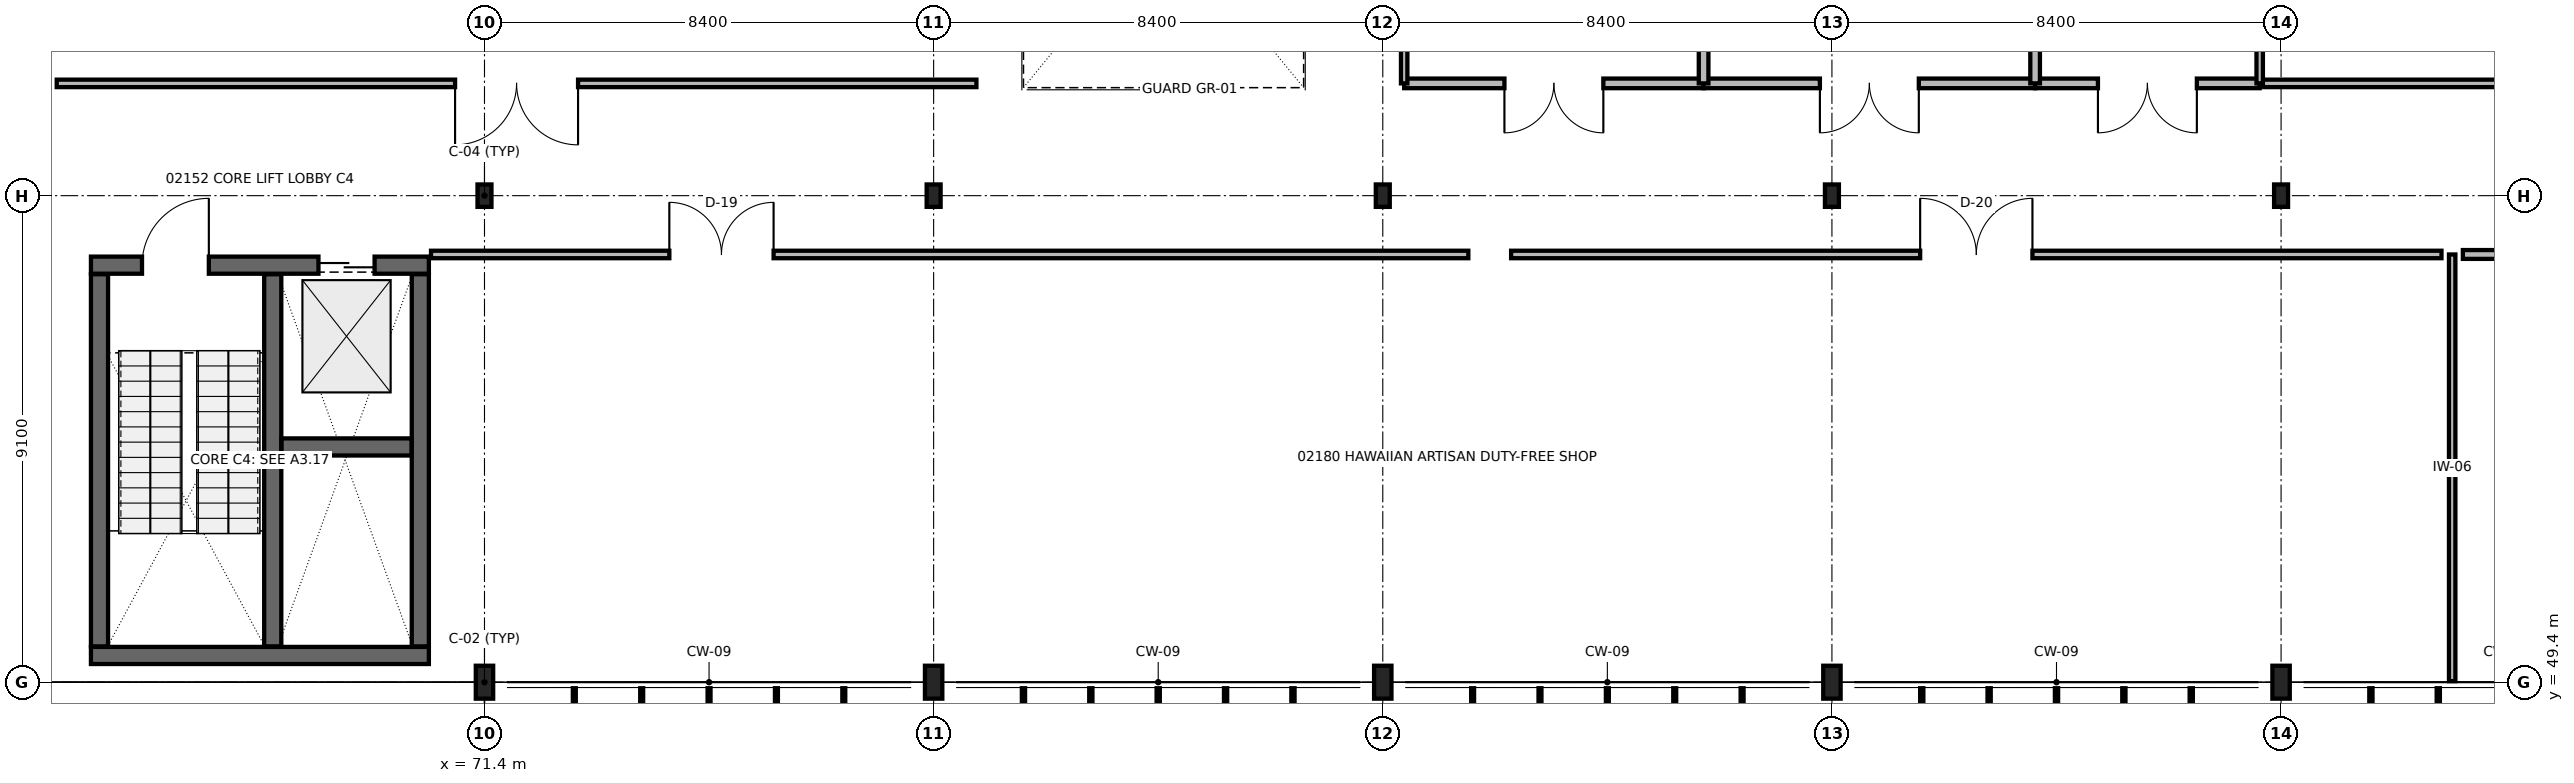
"""IFC4 building model, lengths in metres.
Left out: names, types, materials, properties, quantities, classifications, styles, units other than length and angle.
Written with IfcOpenShell. Run it as: python <this file> out.ifc"""

import sys

from ifc_helpers import new_model, si_unit, direction, frame, frame_2d, origin, origin_2d, place, context, subcontext, project, spatial, rectangle, i_section, extrude, element, fill, save


model = new_model("IFC4")
c1 = context("Model", 3, precision=1e-05, world=origin(), true_north=direction((0.0, 1.0)))
c2 = subcontext(c1, "Body", "Model", "MODEL_VIEW")
j1 = project(units=[si_unit("LENGTHUNIT", "METRE"), si_unit("PLANEANGLEUNIT", "RADIAN")], contexts=[c1])
p1 = place(None, origin())
s1 = spatial("IfcSite", under=j1, at=p1, CompositionType="ELEMENT")
p2 = place(p1, origin())
s2 = spatial("IfcBuilding", under=s1, at=p2, CompositionType="ELEMENT")
p3 = place(p2, frame((0.0, 0.0, 9.6)))
s3 = spatial("IfcBuildingStorey", under=s2, at=p3, CompositionType="ELEMENT", Elevation=9.6)
p4 = place(p3, frame((71.4, 49.4, 0.0), z_axis=(0.0, 0.0, 1.0), x_axis=(1.0, 0.0, 0.0)))
e1 = element("IfcColumn", 1, at=p4, inside=s3, PredefinedType="COLUMN", context=c2, shape_type="SweptSolid", body=[
    extrude(i_section(OverallWidth=0.325, OverallDepth=0.616, WebThickness=0.014, FlangeThickness=0.021, at=origin_2d()), origin(), (0.0, 0.0, 1.0), 4.2),
])
p5 = place(p3, frame((71.4, 58.5, 0.0), z_axis=(0.0, 0.0, 1.0), x_axis=(1.0, 0.0, 0.0)))
e2 = element("IfcColumn", 2, at=p5, inside=s3, PredefinedType="COLUMN", context=c2, shape_type="SweptSolid", body=[
    extrude(i_section(OverallWidth=0.261, OverallDepth=0.419, WebThickness=0.012, FlangeThickness=0.019, at=origin_2d()), origin(), (0.0, 0.0, 1.0), 4.2),
])
p6 = place(p3, frame((79.8, 49.4, 0.0), z_axis=(0.0, 0.0, 1.0), x_axis=(1.0, 0.0, 0.0)))
e3 = element("IfcColumn", 3, at=p6, inside=s3, PredefinedType="COLUMN", context=c2, shape_type="SweptSolid", body=[
    extrude(i_section(OverallWidth=0.325, OverallDepth=0.616, WebThickness=0.014, FlangeThickness=0.021, at=origin_2d()), origin(), (0.0, 0.0, 1.0), 4.2),
])
p7 = place(p3, frame((79.8, 58.5, 0.0), z_axis=(0.0, 0.0, 1.0), x_axis=(1.0, 0.0, 0.0)))
e4 = element("IfcColumn", 4, at=p7, inside=s3, PredefinedType="COLUMN", context=c2, shape_type="SweptSolid", body=[
    extrude(i_section(OverallWidth=0.261, OverallDepth=0.419, WebThickness=0.012, FlangeThickness=0.019, at=origin_2d()), origin(), (0.0, 0.0, 1.0), 4.2),
])
p8 = place(p3, frame((88.2, 49.4, 0.0), z_axis=(0.0, 0.0, 1.0), x_axis=(1.0, 0.0, 0.0)))
e5 = element("IfcColumn", 5, at=p8, inside=s3, PredefinedType="COLUMN", context=c2, shape_type="SweptSolid", body=[
    extrude(i_section(OverallWidth=0.325, OverallDepth=0.616, WebThickness=0.014, FlangeThickness=0.021, at=origin_2d()), origin(), (0.0, 0.0, 1.0), 4.2),
])
p9 = place(p3, frame((88.2, 58.5, 0.0), z_axis=(0.0, 0.0, 1.0), x_axis=(1.0, 0.0, 0.0)))
e6 = element("IfcColumn", 6, at=p9, inside=s3, PredefinedType="COLUMN", context=c2, shape_type="SweptSolid", body=[
    extrude(i_section(OverallWidth=0.261, OverallDepth=0.419, WebThickness=0.012, FlangeThickness=0.019, at=origin_2d()), origin(), (0.0, 0.0, 1.0), 4.2),
])
p10 = place(p3, frame((96.6, 49.4, 0.0), z_axis=(0.0, 0.0, 1.0), x_axis=(1.0, 0.0, 0.0)))
e7 = element("IfcColumn", 7, at=p10, inside=s3, PredefinedType="COLUMN", context=c2, shape_type="SweptSolid", body=[
    extrude(i_section(OverallWidth=0.325, OverallDepth=0.616, WebThickness=0.014, FlangeThickness=0.021, at=origin_2d()), origin(), (0.0, 0.0, 1.0), 4.2),
])
p11 = place(p3, frame((96.6, 58.5, 0.0), z_axis=(0.0, 0.0, 1.0), x_axis=(1.0, 0.0, 0.0)))
e8 = element("IfcColumn", 8, at=p11, inside=s3, PredefinedType="COLUMN", context=c2, shape_type="SweptSolid", body=[
    extrude(i_section(OverallWidth=0.261, OverallDepth=0.419, WebThickness=0.012, FlangeThickness=0.019, at=origin_2d()), origin(), (0.0, 0.0, 1.0), 4.2),
])
p12 = place(p3, frame((105.0, 49.4, 0.0), z_axis=(0.0, 0.0, 1.0), x_axis=(1.0, 0.0, 0.0)))
e9 = element("IfcColumn", 9, at=p12, inside=s3, PredefinedType="COLUMN", context=c2, shape_type="SweptSolid", body=[
    extrude(i_section(OverallWidth=0.325, OverallDepth=0.616, WebThickness=0.014, FlangeThickness=0.021, at=origin_2d()), origin(), (0.0, 0.0, 1.0), 4.2),
])
p13 = place(p3, frame((105.0, 58.5, 0.0), z_axis=(0.0, 0.0, 1.0), x_axis=(1.0, 0.0, 0.0)))
e10 = element("IfcColumn", 10, at=p13, inside=s3, PredefinedType="COLUMN", context=c2, shape_type="SweptSolid", body=[
    extrude(i_section(OverallWidth=0.261, OverallDepth=0.419, WebThickness=0.012, FlangeThickness=0.019, at=origin_2d()), origin(), (0.0, 0.0, 1.0), 4.2),
])
p14 = place(p3, frame((64.04, 49.9, 0.0), z_axis=(0.0, 0.0, 1.0), x_axis=(1.0, 0.0, 0.0)))
e11 = element("IfcWall", 11, at=p14, inside=s3, PredefinedType="SHEAR", context=c2, shape_type="SweptSolid", body=[
    extrude(rectangle(XDim=6.32, YDim=0.32, at=frame_2d((3.16, 0.0))), origin(), (0.0, 0.0, 1.0), 3.92),
])
p15 = place(p3, frame((64.04, 57.2, 0.0), z_axis=(0.0, 0.0, 1.0), x_axis=(1.0, 0.0, 0.0)))
e12 = element("IfcWall", 12, at=p15, inside=s3, PredefinedType="SHEAR", context=c2, shape_type="SweptSolid", body=[
    extrude(rectangle(XDim=6.32, YDim=0.32, at=frame_2d((3.16, 0.0))), origin(), (0.0, 0.0, 1.0), 3.92),
])
p16 = place(p15, frame((0.955, 0.0, 0.0)))
e13 = element("IfcOpeningElement", 13, at=p16, cuts=e12, PredefinedType="OPENING", context=c2, shape_type="SweptSolid", body=[
    extrude(rectangle(XDim=1.25, YDim=2.2, at=frame_2d((0.625, 1.1))), frame((0.0, 0.17, 0.0), z_axis=(0.0, -1.0, 0.0), x_axis=(1.0, 0.0, 0.0)), (0.0, 0.0, 1.0), 0.34),
])
p17 = place(p15, frame((4.255, 0.0, 0.0)))
e14 = element("IfcOpeningElement", 14, at=p17, cuts=e12, PredefinedType="OPENING", context=c2, shape_type="SweptSolid", body=[
    extrude(rectangle(XDim=1.05, YDim=2.15, at=frame_2d((0.525, 1.075))), frame((0.0, 0.17, 0.0), z_axis=(0.0, -1.0, 0.0), x_axis=(1.0, 0.0, 0.0)), (0.0, 0.0, 1.0), 0.34),
])
for number, where, z_axis, x_axis in (
    (15, (64.2, 50.07, 0.0), (0.0, 0.0, 1.0), (0.0, 1.0, 0.0)),
    (16, (70.2, 50.07, 0.0), (0.0, 0.0, 1.0), (0.0, 1.0, 0.0)),
    (17, (67.44, 50.07, 0.0), (0.0, 0.0, 1.0), (0.0, 1.0, 0.0)),
):
    element("IfcWall", number, at=place(p3, frame(where, z_axis=z_axis, x_axis=x_axis)), inside=s3, PredefinedType="SHEAR", context=c2, shape_type="SweptSolid", body=[
        extrude(rectangle(XDim=6.96, YDim=0.32, at=frame_2d((3.48, 0.0))), origin(), (0.0, 0.0, 1.0), 3.92),
    ])
p18 = place(p3, frame((67.605, 53.8, 0.0), z_axis=(0.0, 0.0, 1.0), x_axis=(1.0, 0.0, 0.0)))
e18 = element("IfcWall", 18, at=p18, inside=s3, PredefinedType="SHEAR", context=c2, shape_type="SweptSolid", body=[
    extrude(rectangle(XDim=2.43, YDim=0.32, at=frame_2d((1.215, 0.0))), origin(), (0.0, 0.0, 1.0), 3.92),
])
p19 = place(p3, frame((70.4, 57.4, 0.0), z_axis=(0.0, 0.0, 1.0), x_axis=(1.0, 0.0, 0.0)))
e19 = element("IfcWall", 19, at=p19, inside=s3, PredefinedType="PARTITIONING", context=c2, shape_type="SweptSolid", body=[
    extrude(rectangle(XDim=19.4, YDim=0.14, at=frame_2d((9.7, 0.0))), origin(), (0.0, 0.0, 1.0), 3.242),
])
p20 = place(p19, frame((4.457, 0.0, 0.0)))
e20 = element("IfcOpeningElement", 20, at=p20, cuts=e19, PredefinedType="OPENING", context=c2, shape_type="SweptSolid", body=[
    extrude(rectangle(XDim=1.95, YDim=2.35, at=frame_2d((0.975, 1.175))), frame((0.0, 0.08, 0.0), z_axis=(0.0, -1.0, 0.0), x_axis=(1.0, 0.0, 0.0)), (0.0, 0.0, 1.0), 0.16),
])
p21 = place(p3, frame((90.6, 57.4, 0.0), z_axis=(0.0, 0.0, 1.0), x_axis=(1.0, 0.0, 0.0)))
e21 = element("IfcWall", 21, at=p21, inside=s3, PredefinedType="PARTITIONING", context=c2, shape_type="SweptSolid", body=[
    extrude(rectangle(XDim=17.4, YDim=0.14, at=frame_2d((8.7, 0.0))), origin(), (0.0, 0.0, 1.0), 3.242),
])
p22 = place(p21, frame((7.65, 0.0, 0.0)))
e22 = element("IfcOpeningElement", 22, at=p22, cuts=e21, PredefinedType="OPENING", context=c2, shape_type="SweptSolid", body=[
    extrude(rectangle(XDim=2.1, YDim=2.4, at=frame_2d((1.05, 1.2))), frame((0.0, 0.08, 0.0), z_axis=(0.0, -1.0, 0.0), x_axis=(1.0, 0.0, 0.0)), (0.0, 0.0, 1.0), 0.16),
])
p23 = place(p3, frame((108.4, 57.4, 0.0), z_axis=(0.0, 0.0, 1.0), x_axis=(1.0, 0.0, 0.0)))
e23 = element("IfcWall", 23, at=p23, inside=s3, PredefinedType="PARTITIONING", context=c2, shape_type="SweptSolid", body=[
    extrude(rectangle(XDim=30.16, YDim=0.165, at=frame_2d((15.08, 0.0))), origin(), (0.0, 0.0, 1.0), 3.242),
])
p24 = place(p23, frame((14.405, 0.0, 0.0)))
e24 = element("IfcOpeningElement", 24, at=p24, cuts=e23, PredefinedType="OPENING", context=c2, shape_type="SweptSolid", body=[
    extrude(rectangle(XDim=1.35, YDim=2.2, at=frame_2d((0.675, 1.1))), frame((0.0, 0.093, 0.0), z_axis=(0.0, -1.0, 0.0), x_axis=(1.0, 0.0, 0.0)), (0.0, 0.0, 1.0), 0.185),
])
p25 = place(p3, frame((108.2, 49.42, 0.0), z_axis=(0.0, 0.0, 1.0), x_axis=(0.0, 1.0, 0.0)))
e25 = element("IfcWall", 25, at=p25, inside=s3, PredefinedType="PARTITIONING", context=c2, shape_type="SweptSolid", body=[
    extrude(rectangle(XDim=7.98, YDim=0.12, at=frame_2d((3.99, 0.0))), origin(), (0.0, 0.0, 1.0), 3.92),
])
p26 = place(p3, frame((63.4, 60.6, 0.0), z_axis=(0.0, 0.0, 1.0), x_axis=(1.0, 0.0, 0.0)))
e26 = element("IfcWall", 26, at=p26, inside=s3, PredefinedType="PARTITIONING", context=c2, shape_type="SweptSolid", body=[
    extrude(rectangle(XDim=17.2, YDim=0.14, at=frame_2d((8.6, 0.0))), origin(), (0.0, 0.0, 1.0), 3.242),
])
p27 = place(p26, frame((7.45, 0.0, 0.0)))
e27 = element("IfcOpeningElement", 27, at=p27, cuts=e26, PredefinedType="OPENING", context=c2, shape_type="SweptSolid", body=[
    extrude(rectangle(XDim=2.3, YDim=2.45, at=frame_2d((1.15, 1.225))), frame((0.0, 0.08, 0.0), z_axis=(0.0, -1.0, 0.0), x_axis=(1.0, 0.0, 0.0)), (0.0, 0.0, 1.0), 0.16),
])
p28 = place(p3, frame((88.6, 60.6, 0.0), z_axis=(0.0, 0.0, 1.0), x_axis=(1.0, 0.0, 0.0)))
e28 = element("IfcWall", 28, at=p28, inside=s3, PredefinedType="PARTITIONING", context=c2, shape_type="SweptSolid", body=[
    extrude(rectangle(XDim=5.6, YDim=0.18, at=frame_2d((2.8, 0.0))), origin(), (0.0, 0.0, 1.0), 3.398),
])
p29 = place(p28, frame((1.875, 0.0, 0.0)))
e29 = element("IfcOpeningElement", 29, at=p29, cuts=e28, PredefinedType="OPENING", context=c2, shape_type="SweptSolid", body=[
    extrude(rectangle(XDim=1.85, YDim=2.3, at=frame_2d((0.925, 1.15))), frame((0.0, 0.1, 0.0), z_axis=(0.0, -1.0, 0.0), x_axis=(1.0, 0.0, 0.0)), (0.0, 0.0, 1.0), 0.2),
])
p30 = place(p3, frame((94.2, 60.6, 0.0), z_axis=(0.0, 0.0, 1.0), x_axis=(1.0, 0.0, 0.0)))
e30 = element("IfcWall", 30, at=p30, inside=s3, PredefinedType="PARTITIONING", context=c2, shape_type="SweptSolid", body=[
    extrude(rectangle(XDim=6.2, YDim=0.18, at=frame_2d((3.1, 0.0))), origin(), (0.0, 0.0, 1.0), 3.242),
])
p31 = place(p30, frame((2.175, 0.0, 0.0)))
e31 = element("IfcOpeningElement", 31, at=p31, cuts=e30, PredefinedType="OPENING", context=c2, shape_type="SweptSolid", body=[
    extrude(rectangle(XDim=1.85, YDim=2.3, at=frame_2d((0.925, 1.15))), frame((0.0, 0.1, 0.0), z_axis=(0.0, -1.0, 0.0), x_axis=(1.0, 0.0, 0.0)), (0.0, 0.0, 1.0), 0.2),
])
p32 = place(p3, frame((100.4, 60.6, 0.0), z_axis=(0.0, 0.0, 1.0), x_axis=(1.0, 0.0, 0.0)))
e32 = element("IfcWall", 32, at=p32, inside=s3, PredefinedType="PARTITIONING", context=c2, shape_type="SweptSolid", body=[
    extrude(rectangle(XDim=4.2, YDim=0.18, at=frame_2d((2.1, 0.0))), origin(), (0.0, 0.0, 1.0), 3.398),
])
p33 = place(p32, frame((1.175, 0.0, 0.0)))
e33 = element("IfcOpeningElement", 33, at=p33, cuts=e32, PredefinedType="OPENING", context=c2, shape_type="SweptSolid", body=[
    extrude(rectangle(XDim=1.85, YDim=2.3, at=frame_2d((0.925, 1.15))), frame((0.0, 0.1, 0.0), z_axis=(0.0, -1.0, 0.0), x_axis=(1.0, 0.0, 0.0)), (0.0, 0.0, 1.0), 0.2),
])
p34 = place(p3, frame((104.6, 60.6, 0.0), z_axis=(0.0, 0.0, 1.0), x_axis=(1.0, 0.0, 0.0)))
e34 = element("IfcWall", 34, at=p34, inside=s3, PredefinedType="PARTITIONING", context=c2, shape_type="SweptSolid", body=[
    extrude(rectangle(XDim=33.96, YDim=0.14, at=frame_2d((16.98, 0.0))), origin(), (0.0, 0.0, 1.0), 3.242),
])
p35 = place(p34, frame((14.407, 0.0, 0.0)))
e35 = element("IfcOpeningElement", 35, at=p35, cuts=e34, PredefinedType="OPENING", context=c2, shape_type="SweptSolid", body=[
    extrude(rectangle(XDim=1.75, YDim=2.35, at=frame_2d((0.875, 1.175))), frame((0.0, 0.08, 0.0), z_axis=(0.0, -1.0, 0.0), x_axis=(1.0, 0.0, 0.0)), (0.0, 0.0, 1.0), 0.16),
])
p36 = place(p3, frame((88.6, 60.6, 0.0), z_axis=(0.0, 0.0, 1.0), x_axis=(0.0, 1.0, 0.0)))
e36 = element("IfcWall", 36, at=p36, inside=s3, PredefinedType="PARTITIONING", context=c2, shape_type="SweptSolid", body=[
    extrude(rectangle(XDim=15.9, YDim=0.12, at=frame_2d((7.95, 0.0))), origin(), (0.0, 0.0, 1.0), 3.242),
])
p37 = place(p36, frame((10.298, 0.0, 0.0)))
e37 = element("IfcOpeningElement", 37, at=p37, cuts=e36, PredefinedType="OPENING", context=c2, shape_type="SweptSolid", body=[
    extrude(rectangle(XDim=2.3, YDim=2.45, at=frame_2d((1.15, 1.225))), frame((0.0, 0.07, 0.0), z_axis=(0.0, -1.0, 0.0), x_axis=(1.0, 0.0, 0.0)), (0.0, 0.0, 1.0), 0.14),
])
p38 = place(p3, frame((94.2, 60.6, 0.0), z_axis=(0.0, 0.0, 1.0), x_axis=(0.0, 1.0, 0.0)))
e38 = element("IfcWall", 38, at=p38, inside=s3, PredefinedType="PARTITIONING", context=c2, shape_type="SweptSolid", body=[
    extrude(rectangle(XDim=43.6, YDim=0.18, at=frame_2d((21.8, 0.0))), origin(), (0.0, 0.0, 1.0), 2.54),
])
p39 = place(p38, frame((12.155, 0.0, 0.0)))
e39 = element("IfcOpeningElement", 39, at=p39, cuts=e38, PredefinedType="OPENING", context=c2, shape_type="SweptSolid", body=[
    extrude(rectangle(XDim=1.85, YDim=2.3, at=frame_2d((0.925, 1.15))), frame((0.0, 0.1, 0.0), z_axis=(0.0, -1.0, 0.0), x_axis=(1.0, 0.0, 0.0)), (0.0, 0.0, 1.0), 0.2),
])
p40 = place(p38, frame((33.083, 0.0, 0.0)))
e40 = element("IfcOpeningElement", 40, at=p40, cuts=e38, PredefinedType="OPENING", context=c2, shape_type="SweptSolid", body=[
    extrude(rectangle(XDim=1.85, YDim=2.3, at=frame_2d((0.925, 1.15))), frame((0.0, 0.1, 0.0), z_axis=(0.0, -1.0, 0.0), x_axis=(1.0, 0.0, 0.0)), (0.0, 0.0, 1.0), 0.2),
])
p41 = place(p3, frame((100.4, 60.6, 0.0), z_axis=(0.0, 0.0, 1.0), x_axis=(0.0, 1.0, 0.0)))
e41 = element("IfcWall", 41, at=p41, inside=s3, PredefinedType="PARTITIONING", context=c2, shape_type="SweptSolid", body=[
    extrude(rectangle(XDim=43.6, YDim=0.18, at=frame_2d((21.8, 0.0))), origin(), (0.0, 0.0, 1.0), 2.54),
])
p42 = place(p41, frame((12.155, 0.0, 0.0)))
e42 = element("IfcOpeningElement", 42, at=p42, cuts=e41, PredefinedType="OPENING", context=c2, shape_type="SweptSolid", body=[
    extrude(rectangle(XDim=1.85, YDim=2.3, at=frame_2d((0.925, 1.15))), frame((0.0, 0.1, 0.0), z_axis=(0.0, -1.0, 0.0), x_axis=(1.0, 0.0, 0.0)), (0.0, 0.0, 1.0), 0.2),
])
p43 = place(p41, frame((33.083, 0.0, 0.0)))
e43 = element("IfcOpeningElement", 43, at=p43, cuts=e41, PredefinedType="OPENING", context=c2, shape_type="SweptSolid", body=[
    extrude(rectangle(XDim=1.85, YDim=2.3, at=frame_2d((0.925, 1.15))), frame((0.0, 0.1, 0.0), z_axis=(0.0, -1.0, 0.0), x_axis=(1.0, 0.0, 0.0)), (0.0, 0.0, 1.0), 0.2),
])
p44 = place(p3, frame((104.6, 60.6, 0.0), z_axis=(0.0, 0.0, 1.0), x_axis=(0.0, 1.0, 0.0)))
e44 = element("IfcWall", 44, at=p44, inside=s3, PredefinedType="PARTITIONING", context=c2, shape_type="SweptSolid", body=[
    extrude(rectangle(XDim=15.9, YDim=0.12, at=frame_2d((7.95, 0.0))), origin(), (0.0, 0.0, 1.0), 3.242),
])
p45 = place(p44, frame((10.573, 0.0, 0.0)))
e45 = element("IfcOpeningElement", 45, at=p45, cuts=e44, PredefinedType="OPENING", context=c2, shape_type="SweptSolid", body=[
    extrude(rectangle(XDim=1.75, YDim=2.35, at=frame_2d((0.875, 1.175))), frame((0.0, 0.07, 0.0), z_axis=(0.0, -1.0, 0.0), x_axis=(1.0, 0.0, 0.0)), (0.0, 0.0, 1.0), 0.14),
])
p46 = place(p16, origin())
e46 = element("IfcDoor", 46, at=p46, inside=s3, OperationType="SINGLE_SWING_RIGHT", PredefinedType="DOOR", context=c2, shape_type="SweptSolid", body=[
    extrude(rectangle(XDim=1.25, YDim=2.2, at=frame_2d((0.625, 1.1))), frame((0.0, 0.025, 0.0), z_axis=(0.0, -1.0, 0.0), x_axis=(1.0, 0.0, 0.0)), (0.0, 0.0, 1.0), 0.05),
])
fill(e13, e46)
p47 = place(p17, origin())
e47 = element("IfcDoor", 47, at=p47, inside=s3, OperationType="DOUBLE_DOOR_SLIDING", PredefinedType="DOOR", context=c2, shape_type="SweptSolid", body=[
    extrude(rectangle(XDim=1.05, YDim=2.15, at=frame_2d((0.525, 1.075))), frame((0.0, 0.025, 0.0), z_axis=(0.0, -1.0, 0.0), x_axis=(1.0, 0.0, 0.0)), (0.0, 0.0, 1.0), 0.05),
])
fill(e14, e47)
p48 = place(p20, origin())
e48 = element("IfcDoor", 48, at=p48, inside=s3, OperationType="DOUBLE_DOOR_SINGLE_SWING", PredefinedType="DOOR", context=c2, shape_type="SweptSolid", body=[
    extrude(rectangle(XDim=1.95, YDim=2.35, at=frame_2d((0.975, 1.175))), frame((0.0, 0.025, 0.0), z_axis=(0.0, -1.0, 0.0), x_axis=(1.0, 0.0, 0.0)), (0.0, 0.0, 1.0), 0.05),
])
fill(e20, e48)
p49 = place(p22, origin())
e49 = element("IfcDoor", 49, at=p49, inside=s3, OperationType="DOUBLE_DOOR_SINGLE_SWING", PredefinedType="DOOR", context=c2, shape_type="SweptSolid", body=[
    extrude(rectangle(XDim=2.1, YDim=2.4, at=frame_2d((1.05, 1.2))), frame((0.0, 0.025, 0.0), z_axis=(0.0, -1.0, 0.0), x_axis=(1.0, 0.0, 0.0)), (0.0, 0.0, 1.0), 0.05),
])
fill(e22, e49)
p50 = place(p27, frame((2.3, 0.0, 0.0), z_axis=(0.0, 0.0, 1.0), x_axis=(-1.0, 0.0, 0.0)))
e50 = element("IfcDoor", 50, at=p50, inside=s3, OperationType="DOUBLE_DOOR_SINGLE_SWING", PredefinedType="DOOR", context=c2, shape_type="SweptSolid", body=[
    extrude(rectangle(XDim=2.3, YDim=2.45, at=frame_2d((1.15, 1.225))), frame((0.0, 0.025, 0.0), z_axis=(0.0, -1.0, 0.0), x_axis=(1.0, 0.0, 0.0)), (0.0, 0.0, 1.0), 0.05),
])
fill(e27, e50)
p51 = place(p29, frame((1.85, 0.0, 0.0), z_axis=(0.0, 0.0, 1.0), x_axis=(-1.0, 0.0, 0.0)))
e51 = element("IfcDoor", 51, at=p51, inside=s3, OperationType="DOUBLE_DOOR_SINGLE_SWING", PredefinedType="DOOR", context=c2, shape_type="SweptSolid", body=[
    extrude(rectangle(XDim=1.85, YDim=2.3, at=frame_2d((0.925, 1.15))), frame((0.0, 0.025, 0.0), z_axis=(0.0, -1.0, 0.0), x_axis=(1.0, 0.0, 0.0)), (0.0, 0.0, 1.0), 0.05),
])
fill(e29, e51)
p52 = place(p31, frame((1.85, 0.0, 0.0), z_axis=(0.0, 0.0, 1.0), x_axis=(-1.0, 0.0, 0.0)))
e52 = element("IfcDoor", 52, at=p52, inside=s3, OperationType="DOUBLE_DOOR_SINGLE_SWING", PredefinedType="DOOR", context=c2, shape_type="SweptSolid", body=[
    extrude(rectangle(XDim=1.85, YDim=2.3, at=frame_2d((0.925, 1.15))), frame((0.0, 0.025, 0.0), z_axis=(0.0, -1.0, 0.0), x_axis=(1.0, 0.0, 0.0)), (0.0, 0.0, 1.0), 0.05),
])
fill(e31, e52)
p53 = place(p33, frame((1.85, 0.0, 0.0), z_axis=(0.0, 0.0, 1.0), x_axis=(-1.0, 0.0, 0.0)))
e53 = element("IfcDoor", 53, at=p53, inside=s3, OperationType="DOUBLE_DOOR_SINGLE_SWING", PredefinedType="DOOR", context=c2, shape_type="SweptSolid", body=[
    extrude(rectangle(XDim=1.85, YDim=2.3, at=frame_2d((0.925, 1.15))), frame((0.0, 0.025, 0.0), z_axis=(0.0, -1.0, 0.0), x_axis=(1.0, 0.0, 0.0)), (0.0, 0.0, 1.0), 0.05),
])
fill(e33, e53)
save(model, sys.argv[1])
